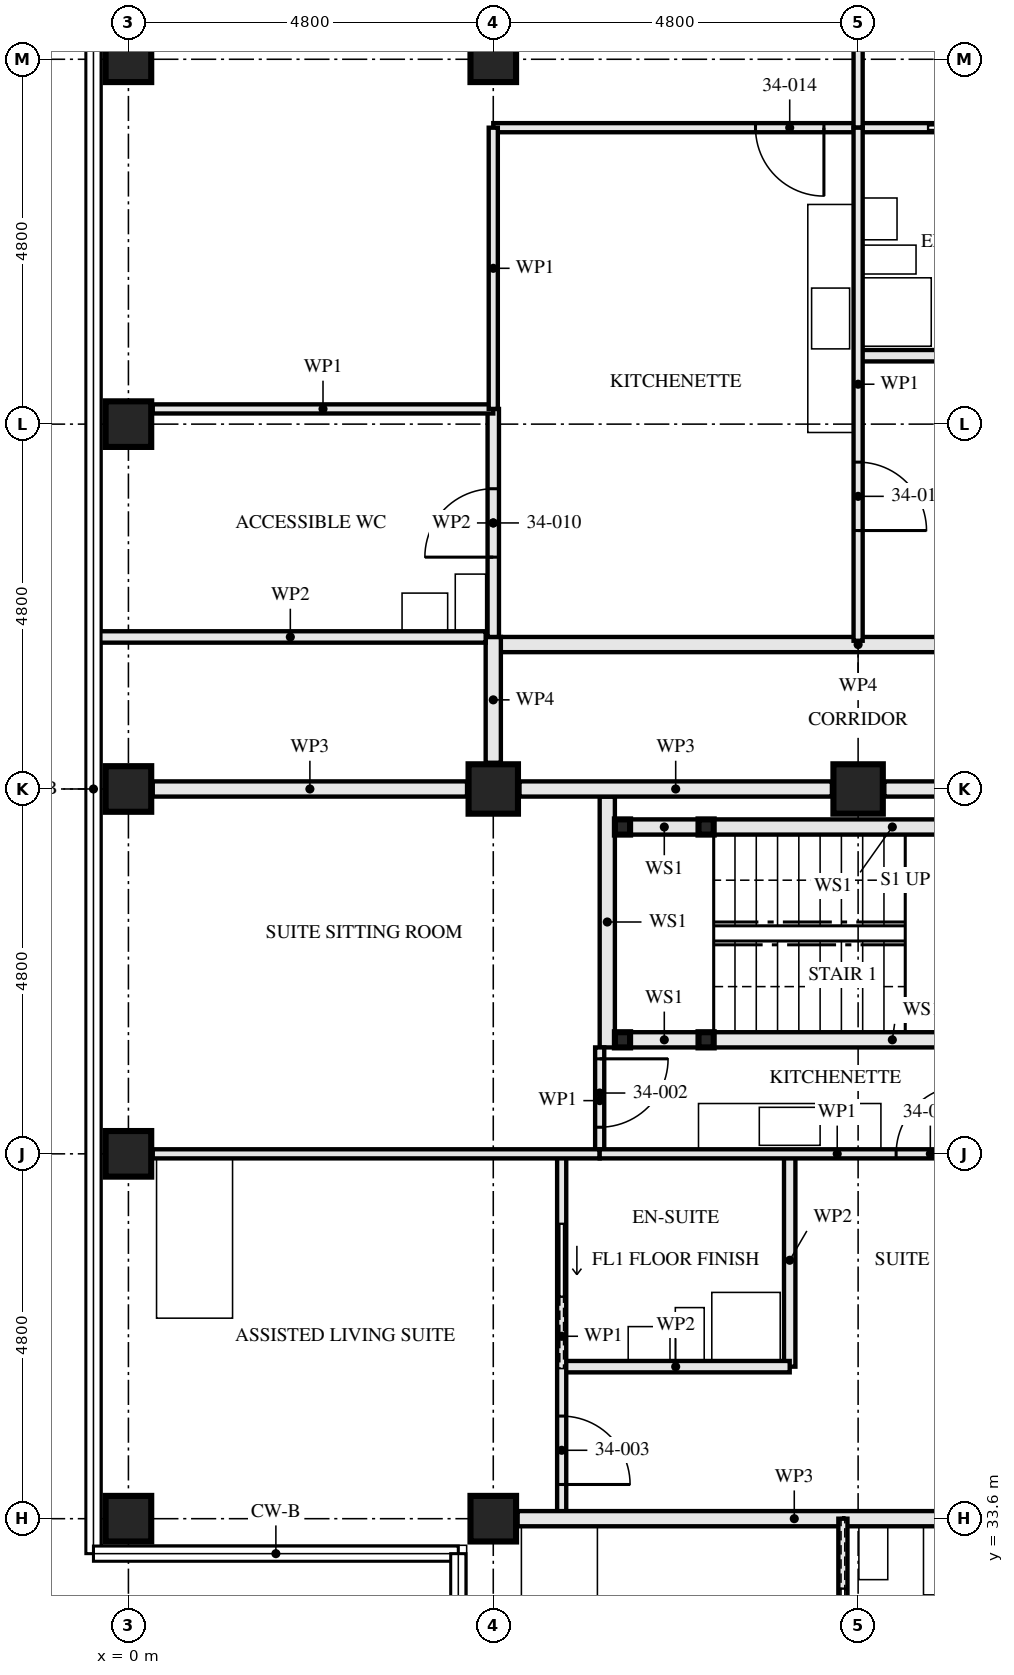
"""IFC4 building model, lengths in metres.
Left out: names, types, materials, properties, quantities, classifications, styles, units other than length and angle.
Written with IfcOpenShell. Run it as: python <this file> out.ifc"""

import sys

from ifc_helpers import new_model, si_unit, direction, frame, frame_2d, origin, origin_2d, place, context, subcontext, project, spatial, rectangle, hollow_rectangle, extrude, element, fill, save


model = new_model("IFC4")
c1 = context("Model", 3, precision=1e-05, world=origin(), true_north=direction((0.0, 1.0)))
c2 = subcontext(c1, "Body", "Model", "MODEL_VIEW")
j1 = project(units=[si_unit("LENGTHUNIT", "METRE"), si_unit("PLANEANGLEUNIT", "RADIAN")], contexts=[c1])
p1 = place(None, origin())
s1 = spatial("IfcSite", under=j1, at=p1, CompositionType="ELEMENT")
p2 = place(p1, origin())
s2 = spatial("IfcBuilding", under=s1, at=p2, CompositionType="ELEMENT")
p3 = place(p2, frame((0.0, 0.0, 126.0)))
s3 = spatial("IfcBuildingStorey", under=s2, at=p3, CompositionType="ELEMENT", Elevation=126.0)
for number, where, z_axis, x_axis in (
    (1, (0.0, 33.6, 0.0), (0.0, 0.0, 1.0), (0.0, 1.0, 0.0)),
    (2, (0.0, 38.4, 0.0), (0.0, 0.0, 1.0), (1.0, 0.0, 0.0)),
    (3, (0.0, 43.2, 0.0), (0.0, 0.0, 1.0), (0.0, 1.0, 0.0)),
    (4, (0.0, 48.0, 0.0), (0.0, 0.0, 1.0), (1.0, 0.0, 0.0)),
    (5, (0.0, 52.8, 0.0), (0.0, 0.0, 1.0), (0.0, 1.0, 0.0)),
    (6, (4.8, 33.6, 0.0), (0.0, 0.0, 1.0), (0.0, 1.0, 0.0)),
):
    element("IfcColumn", number, at=place(p3, frame(where, z_axis=z_axis, x_axis=x_axis)), inside=s3, PredefinedType="COLUMN", context=c2, shape_type="SweptSolid", body=[
        extrude(hollow_rectangle(XDim=0.6, YDim=0.6, WallThickness=0.08, at=origin_2d()), origin(), (0.0, 0.0, 1.0), 3.5),
    ])
p4 = place(p3, frame((4.8, 43.2, 0.0), z_axis=(0.0, 0.0, 1.0), x_axis=(0.0, 1.0, 0.0)))
e7 = element("IfcColumn", 7, at=p4, inside=s3, PredefinedType="COLUMN", context=c2, shape_type="SweptSolid", body=[
    extrude(hollow_rectangle(XDim=0.65, YDim=0.65, WallThickness=0.05, at=origin_2d()), origin(), (0.0, 0.0, 1.0), 3.5),
])
p5 = place(p3, frame((4.8, 52.8, 0.0), z_axis=(0.0, 0.0, 1.0), x_axis=(0.0, 1.0, 0.0)))
e8 = element("IfcColumn", 8, at=p5, inside=s3, PredefinedType="COLUMN", context=c2, shape_type="SweptSolid", body=[
    extrude(hollow_rectangle(XDim=0.6, YDim=0.6, WallThickness=0.08, at=origin_2d()), origin(), (0.0, 0.0, 1.0), 3.5),
])
p6 = place(p3, frame((9.6, 43.2, 0.0), z_axis=(0.0, 0.0, 1.0), x_axis=(0.0, 1.0, 0.0)))
e9 = element("IfcColumn", 9, at=p6, inside=s3, PredefinedType="COLUMN", context=c2, shape_type="SweptSolid", body=[
    extrude(hollow_rectangle(XDim=0.65, YDim=0.65, WallThickness=0.05, at=origin_2d()), origin(), (0.0, 0.0, 1.0), 3.5),
])
for number, where, z_axis, x_axis in (
    (10, (6.5, 42.7, 0.0), (0.0, 0.0, 1.0), (1.0, 0.0, 0.0)),
    (11, (6.5, 39.9, 0.0), (0.0, 0.0, 1.0), (1.0, 0.0, 0.0)),
    (12, (7.6, 42.7, 0.0), (0.0, 0.0, 1.0), (1.0, 0.0, 0.0)),
    (13, (7.6, 39.9, 0.0), (0.0, 0.0, 1.0), (1.0, 0.0, 0.0)),
):
    element("IfcColumn", number, at=place(p3, frame(where, z_axis=z_axis, x_axis=x_axis)), inside=s3, PredefinedType="COLUMN", context=c2, shape_type="SweptSolid", body=[
        extrude(hollow_rectangle(XDim=0.2, YDim=0.2, WallThickness=0.008, at=origin_2d()), origin(), (0.0, 0.0, 1.0), 3.33),
    ])
p7 = place(p3, frame((6.6, 42.7, 0.0), z_axis=(0.0, 0.0, 1.0), x_axis=(1.0, 0.0, 0.0)))
e14 = element("IfcWall", 14, at=p7, inside=s3, PredefinedType="SOLIDWALL", context=c2, shape_type="SweptSolid", body=[
    extrude(rectangle(XDim=0.9, YDim=0.2, at=frame_2d((0.45, 0.0))), origin(), (0.0, 0.0, 1.0), 2.99),
])
p8 = place(p3, frame((7.7, 42.7, 0.0), z_axis=(0.0, 0.0, 1.0), x_axis=(1.0, 0.0, 0.0)))
e15 = element("IfcWall", 15, at=p8, inside=s3, PredefinedType="SOLIDWALL", context=c2, shape_type="SweptSolid", body=[
    extrude(rectangle(XDim=4.7, YDim=0.2, at=frame_2d((2.35, 0.0))), origin(), (0.0, 0.0, 1.0), 2.99),
])
p9 = place(p3, frame((6.6, 39.9, 0.0), z_axis=(0.0, 0.0, 1.0), x_axis=(1.0, 0.0, 0.0)))
e16 = element("IfcWall", 16, at=p9, inside=s3, PredefinedType="SOLIDWALL", context=c2, shape_type="SweptSolid", body=[
    extrude(rectangle(XDim=0.9, YDim=0.2, at=frame_2d((0.45, 0.0))), origin(), (0.0, 0.0, 1.0), 2.99),
])
p10 = place(p3, frame((7.7, 39.9, 0.0), z_axis=(0.0, 0.0, 1.0), x_axis=(1.0, 0.0, 0.0)))
e17 = element("IfcWall", 17, at=p10, inside=s3, PredefinedType="SOLIDWALL", context=c2, shape_type="SweptSolid", body=[
    extrude(rectangle(XDim=4.7, YDim=0.2, at=frame_2d((2.35, 0.0))), origin(), (0.0, 0.0, 1.0), 2.99),
])
p11 = place(p3, frame((6.3, 43.1, 0.0), z_axis=(0.0, 0.0, 1.0), x_axis=(0.0, -1.0, 0.0)))
e18 = element("IfcWall", 18, at=p11, inside=s3, PredefinedType="SOLIDWALL", context=c2, shape_type="SweptSolid", body=[
    extrude(rectangle(XDim=3.3, YDim=0.2, at=frame_2d((1.65, 0.0))), origin(), (0.0, 0.0, 1.0), 3.33),
])
p12 = place(p3, frame((5.7, 35.6, 0.0), z_axis=(0.0, 0.0, 1.0), x_axis=(1.0, 0.0, 0.0)))
e19 = element("IfcWall", 19, at=p12, inside=s3, PredefinedType="PARTITIONING", context=c2, shape_type="SweptSolid", body=[
    extrude(rectangle(XDim=3.0, YDim=0.15, at=frame_2d((1.5, 0.0))), origin(), (0.0, 0.0, 1.0), 3.33),
])
p13 = place(p3, frame((8.7, 38.4, 0.0), z_axis=(0.0, 0.0, 1.0), x_axis=(0.0, -1.0, 0.0)))
e20 = element("IfcWall", 20, at=p13, inside=s3, PredefinedType="PARTITIONING", context=c2, shape_type="SweptSolid", body=[
    extrude(rectangle(XDim=2.8, YDim=0.15, at=frame_2d((1.4, 0.0))), origin(), (0.0, 0.0, 1.0), 3.33),
])
p14 = place(p3, frame((6.2, 38.4, 0.0), z_axis=(0.0, 0.0, 1.0), x_axis=(1.0, 0.0, 0.0)))
e21 = element("IfcWall", 21, at=p14, inside=s3, PredefinedType="PARTITIONING", context=c2, shape_type="SweptSolid", body=[
    extrude(rectangle(XDim=6.25, YDim=0.12, at=frame_2d((3.125, 0.0))), origin(), (0.0, 0.0, 1.0), 2.55),
])
p15 = place(p14, frame((3.9, 0.0, 0.0)))
e22 = element("IfcOpeningElement", 22, at=p15, cuts=e21, PredefinedType="OPENING", context=c2, shape_type="SweptSolid", body=[
    extrude(rectangle(XDim=0.9, YDim=2.1, at=frame_2d((0.45, 1.05))), frame((0.0, 0.071, 0.0), z_axis=(0.0, -1.0, 0.0), x_axis=(1.0, 0.0, 0.0)), (0.0, 0.0, 1.0), 0.141),
])
p16 = place(p3, frame((6.2, 39.8, 0.0), z_axis=(0.0, 0.0, 1.0), x_axis=(0.0, -1.0, 0.0)))
e23 = element("IfcWall", 23, at=p16, inside=s3, PredefinedType="PARTITIONING", context=c2, shape_type="SweptSolid", body=[
    extrude(rectangle(XDim=1.4, YDim=0.12, at=frame_2d((0.7, 0.0))), origin(), (0.0, 0.0, 1.0), 3.33),
])
p17 = place(p16, frame((0.15, 0.0, 0.0)))
e24 = element("IfcOpeningElement", 24, at=p17, cuts=e23, PredefinedType="OPENING", context=c2, shape_type="SweptSolid", body=[
    extrude(rectangle(XDim=0.9, YDim=2.1, at=frame_2d((0.45, 1.05))), frame((0.0, 0.071, 0.0), z_axis=(0.0, -1.0, 0.0), x_axis=(1.0, 0.0, 0.0)), (0.0, 0.0, 1.0), 0.141),
])
p18 = place(p3, frame((5.7, 38.4, 0.0), z_axis=(0.0, 0.0, 1.0), x_axis=(0.0, -1.0, 0.0)))
e25 = element("IfcWall", 25, at=p18, inside=s3, PredefinedType="PARTITIONING", context=c2, shape_type="SweptSolid", body=[
    extrude(rectangle(XDim=4.8, YDim=0.12, at=frame_2d((2.4, 0.0))), origin(), (0.0, 0.0, 1.0), 3.33),
])
p19 = place(p18, frame((3.45, 0.0, 0.0)))
e26 = element("IfcOpeningElement", 26, at=p19, cuts=e25, PredefinedType="OPENING", context=c2, shape_type="SweptSolid", body=[
    extrude(rectangle(XDim=0.9, YDim=2.1, at=frame_2d((0.45, 1.05))), frame((0.0, 0.071, 0.0), z_axis=(0.0, -1.0, 0.0), x_axis=(1.0, 0.0, 0.0)), (0.0, 0.0, 1.0), 0.141),
])
p20 = place(p18, frame((0.925, 0.0, 0.0)))
e27 = element("IfcOpeningElement", 27, at=p20, cuts=e25, PredefinedType="OPENING", context=c2, shape_type="SweptSolid", body=[
    extrude(rectangle(XDim=0.95, YDim=2.1, at=frame_2d((0.475, 1.05))), frame((0.0, 0.071, 0.0), z_axis=(0.0, -1.0, 0.0), x_axis=(1.0, 0.0, 0.0)), (0.0, 0.0, 1.0), 0.141),
])
p21 = place(p3, frame((0.32, 38.4, 0.0), z_axis=(0.0, 0.0, 1.0), x_axis=(1.0, 0.0, 0.0)))
e28 = element("IfcWall", 28, at=p21, inside=s3, PredefinedType="PARTITIONING", context=c2, shape_type="SweptSolid", body=[
    extrude(rectangle(XDim=5.88, YDim=0.12, at=frame_2d((2.94, 0.0))), origin(), (0.0, 0.0, 1.0), 2.55),
])
p22 = place(p3, frame((5.12, 33.6, 0.0), z_axis=(0.0, 0.0, 1.0), x_axis=(1.0, 0.0, 0.0)))
e29 = element("IfcWall", 29, at=p22, inside=s3, PredefinedType="PARTITIONING", context=c2, shape_type="SweptSolid", body=[
    extrude(rectangle(XDim=7.28, YDim=0.2, at=frame_2d((3.64, 0.0))), origin(), (0.0, 0.0, 1.0), 2.55),
])
p23 = place(p3, frame((9.4, 33.6, 0.0), z_axis=(0.0, 0.0, 1.0), x_axis=(0.0, -1.0, 0.0)))
e30 = element("IfcWall", 30, at=p23, inside=s3, PredefinedType="PARTITIONING", context=c2, shape_type="SweptSolid", body=[
    extrude(rectangle(XDim=4.48, YDim=0.12, at=frame_2d((2.24, 0.0))), origin(), (0.0, 0.0, 1.0), 3.33),
])
p24 = place(p23, frame((2.975, 0.0, 0.0)))
e31 = element("IfcOpeningElement", 31, at=p24, cuts=e30, PredefinedType="OPENING", context=c2, shape_type="SweptSolid", body=[
    extrude(rectangle(XDim=0.9, YDim=2.1, at=frame_2d((0.45, 1.05))), frame((0.0, 0.071, 0.0), z_axis=(0.0, -1.0, 0.0), x_axis=(1.0, 0.0, 0.0)), (0.0, 0.0, 1.0), 0.141),
])
p25 = place(p23, frame((0.925, 0.0, 0.0)))
e32 = element("IfcOpeningElement", 32, at=p25, cuts=e30, PredefinedType="OPENING", context=c2, shape_type="SweptSolid", body=[
    extrude(rectangle(XDim=0.95, YDim=2.1, at=frame_2d((0.475, 1.05))), frame((0.0, 0.071, 0.0), z_axis=(0.0, -1.0, 0.0), x_axis=(1.0, 0.0, 0.0)), (0.0, 0.0, 1.0), 0.141),
])
p26 = place(p3, frame((12.4, 48.9, 0.0), z_axis=(0.0, 0.0, 1.0), x_axis=(-1.0, 0.0, 0.0)))
e33 = element("IfcWall", 33, at=p26, inside=s3, PredefinedType="PARTITIONING", context=c2, shape_type="SweptSolid", body=[
    extrude(rectangle(XDim=2.8, YDim=0.15, at=frame_2d((1.4, 0.0))), origin(), (0.0, 0.0, 1.0), 3.33),
])
p27 = place(p3, frame((4.8, 48.2, 0.0), z_axis=(0.0, 0.0, 1.0), x_axis=(0.0, -1.0, 0.0)))
e34 = element("IfcWall", 34, at=p27, inside=s3, PredefinedType="PARTITIONING", context=c2, shape_type="SweptSolid", body=[
    extrude(rectangle(XDim=3.0, YDim=0.15, at=frame_2d((1.5, 0.0))), origin(), (0.0, 0.0, 1.0), 2.55),
])
p28 = place(p27, frame((1.05, 0.0, 0.0)))
e35 = element("IfcOpeningElement", 35, at=p28, cuts=e34, PredefinedType="OPENING", context=c2, shape_type="SweptSolid", body=[
    extrude(rectangle(XDim=0.9, YDim=2.1, at=frame_2d((0.45, 1.05))), frame((0.0, 0.085, 0.0), z_axis=(0.0, -1.0, 0.0), x_axis=(1.0, 0.0, 0.0)), (0.0, 0.0, 1.0), 0.171),
])
p29 = place(p3, frame((9.6, 51.9, 0.0), z_axis=(0.0, 0.0, 1.0), x_axis=(0.0, -1.0, 0.0)))
e36 = element("IfcWall", 36, at=p29, inside=s3, PredefinedType="PARTITIONING", context=c2, shape_type="SweptSolid", body=[
    extrude(rectangle(XDim=6.75, YDim=0.12, at=frame_2d((3.375, 0.0))), origin(), (0.0, 0.0, 1.0), 2.55),
])
p30 = place(p29, frame((4.4, 0.0, 0.0)))
e37 = element("IfcOpeningElement", 37, at=p30, cuts=e36, PredefinedType="OPENING", context=c2, shape_type="SweptSolid", body=[
    extrude(rectangle(XDim=0.9, YDim=2.1, at=frame_2d((0.45, 1.05))), frame((0.0, 0.071, 0.0), z_axis=(0.0, -1.0, 0.0), x_axis=(1.0, 0.0, 0.0)), (0.0, 0.0, 1.0), 0.141),
])
p31 = place(p3, frame((14.4, 51.9, 0.0), z_axis=(0.0, 0.0, 1.0), x_axis=(-1.0, 0.0, 0.0)))
e38 = element("IfcWall", 38, at=p31, inside=s3, PredefinedType="PARTITIONING", context=c2, shape_type="SweptSolid", body=[
    extrude(rectangle(XDim=4.8, YDim=0.12, at=frame_2d((2.4, 0.0))), origin(), (0.0, 0.0, 1.0), 3.33),
])
p32 = place(p31, frame((0.45, 0.0, 0.0)))
e39 = element("IfcOpeningElement", 39, at=p32, cuts=e38, PredefinedType="OPENING", context=c2, shape_type="SweptSolid", body=[
    extrude(rectangle(XDim=0.9, YDim=2.1, at=frame_2d((0.45, 1.05))), frame((0.0, 0.071, 0.0), z_axis=(0.0, -1.0, 0.0), x_axis=(1.0, 0.0, 0.0)), (0.0, 0.0, 1.0), 0.141),
])
p33 = place(p31, frame((2.925, 0.0, 0.0)))
e40 = element("IfcOpeningElement", 40, at=p33, cuts=e38, PredefinedType="OPENING", context=c2, shape_type="SweptSolid", body=[
    extrude(rectangle(XDim=0.95, YDim=2.1, at=frame_2d((0.475, 1.05))), frame((0.0, 0.071, 0.0), z_axis=(0.0, -1.0, 0.0), x_axis=(1.0, 0.0, 0.0)), (0.0, 0.0, 1.0), 0.141),
])
p34 = place(p3, frame((9.6, 51.9, 0.0), z_axis=(0.0, 0.0, 1.0), x_axis=(-1.0, 0.0, 0.0)))
e41 = element("IfcWall", 41, at=p34, inside=s3, PredefinedType="PARTITIONING", context=c2, shape_type="SweptSolid", body=[
    extrude(rectangle(XDim=4.8, YDim=0.12, at=frame_2d((2.4, 0.0))), origin(), (0.0, 0.0, 1.0), 3.33),
])
p35 = place(p34, frame((0.45, 0.0, 0.0)))
e42 = element("IfcOpeningElement", 42, at=p35, cuts=e41, PredefinedType="OPENING", context=c2, shape_type="SweptSolid", body=[
    extrude(rectangle(XDim=0.9, YDim=2.1, at=frame_2d((0.45, 1.05))), frame((0.0, 0.071, 0.0), z_axis=(0.0, -1.0, 0.0), x_axis=(1.0, 0.0, 0.0)), (0.0, 0.0, 1.0), 0.141),
])
p36 = place(p3, frame((4.8, 48.2, 0.0), z_axis=(0.0, 0.0, 1.0), x_axis=(-1.0, 0.0, 0.0)))
e43 = element("IfcWall", 43, at=p36, inside=s3, PredefinedType="PARTITIONING", context=c2, shape_type="SweptSolid", body=[
    extrude(rectangle(XDim=4.48, YDim=0.12, at=frame_2d((2.24, 0.0))), origin(), (0.0, 0.0, 1.0), 3.33),
])
p37 = place(p3, frame((9.6, 57.28, 0.0), z_axis=(0.0, 0.0, 1.0), x_axis=(0.0, -1.0, 0.0)))
e44 = element("IfcWall", 44, at=p37, inside=s3, PredefinedType="PARTITIONING", context=c2, shape_type="SweptSolid", body=[
    extrude(rectangle(XDim=5.38, YDim=0.12, at=frame_2d((2.69, 0.0))), origin(), (0.0, 0.0, 1.0), 2.55),
])
p38 = place(p3, frame((4.8, 51.9, 0.0), z_axis=(0.0, 0.0, 1.0), x_axis=(0.0, -1.0, 0.0)))
e45 = element("IfcWall", 45, at=p38, inside=s3, PredefinedType="PARTITIONING", context=c2, shape_type="SweptSolid", body=[
    extrude(rectangle(XDim=3.7, YDim=0.12, at=frame_2d((1.85, 0.0))), origin(), (0.0, 0.0, 1.0), 3.33),
])
p39 = place(p3, frame((14.4, 45.1, 0.0), z_axis=(0.0, 0.0, 1.0), x_axis=(-1.0, 0.0, 0.0)))
e46 = element("IfcWall", 46, at=p39, inside=s3, PredefinedType="PARTITIONING", context=c2, shape_type="SweptSolid", body=[
    extrude(rectangle(XDim=9.6, YDim=0.2, at=frame_2d((4.8, 0.0))), origin(), (0.0, 0.0, 1.0), 3.33),
])
p40 = place(p39, frame((0.4, 0.0, 0.0)))
e47 = element("IfcOpeningElement", 47, at=p40, cuts=e46, PredefinedType="OPENING", context=c2, shape_type="SweptSolid", body=[
    extrude(rectangle(XDim=1.0, YDim=2.1, at=frame_2d((0.5, 1.05))), frame((0.0, 0.111, 0.0), z_axis=(0.0, -1.0, 0.0), x_axis=(1.0, 0.0, 0.0)), (0.0, 0.0, 1.0), 0.221),
])
p41 = place(p3, frame((4.8, 45.2, 0.0), z_axis=(0.0, 0.0, 1.0), x_axis=(0.0, -1.0, 0.0)))
e48 = element("IfcWall", 48, at=p41, inside=s3, PredefinedType="PARTITIONING", context=c2, shape_type="SweptSolid", body=[
    extrude(rectangle(XDim=1.655, YDim=0.2, at=frame_2d((0.828, 0.0))), origin(), (0.0, 0.0, 1.0), 3.33),
])
p42 = place(p3, frame((12.5, 43.2, 0.0), z_axis=(0.0, 0.0, 1.0), x_axis=(-1.0, 0.0, 0.0)))
e49 = element("IfcWall", 49, at=p42, inside=s3, PredefinedType="PARTITIONING", context=c2, shape_type="SweptSolid", body=[
    extrude(rectangle(XDim=2.555, YDim=0.2, at=frame_2d((1.277, 0.0))), origin(), (0.0, 0.0, 1.0), 2.32),
])
p43 = place(p3, frame((9.255, 43.2, 0.0), z_axis=(0.0, 0.0, 1.0), x_axis=(-1.0, 0.0, 0.0)))
e50 = element("IfcWall", 50, at=p43, inside=s3, PredefinedType="PARTITIONING", context=c2, shape_type="SweptSolid", body=[
    extrude(rectangle(XDim=4.11, YDim=0.2, at=frame_2d((2.055, 0.0))), origin(), (0.0, 0.0, 1.0), 2.32),
])
p44 = place(p3, frame((4.455, 43.2, 0.0), z_axis=(0.0, 0.0, 1.0), x_axis=(-1.0, 0.0, 0.0)))
e51 = element("IfcWall", 51, at=p44, inside=s3, PredefinedType="PARTITIONING", context=c2, shape_type="SweptSolid", body=[
    extrude(rectangle(XDim=4.135, YDim=0.2, at=frame_2d((2.067, 0.0))), origin(), (0.0, 0.0, 1.0), 2.32),
])
p45 = place(p3, frame((4.7, 45.2, 0.0), z_axis=(0.0, 0.0, 1.0), x_axis=(-1.0, 0.0, 0.0)))
e52 = element("IfcWall", 52, at=p45, inside=s3, PredefinedType="PARTITIONING", context=c2, shape_type="SweptSolid", body=[
    extrude(rectangle(XDim=5.14, YDim=0.15, at=frame_2d((2.57, 0.0))), origin(), (0.0, 0.0, 1.0), 2.32),
])
p46 = place(p15, origin())
e53 = element("IfcDoor", 53, at=p46, inside=s3, OperationType="SINGLE_SWING_LEFT", PredefinedType="DOOR", context=c2, shape_type="SweptSolid", body=[
    extrude(rectangle(XDim=0.9, YDim=2.1, at=frame_2d((0.45, 1.05))), frame((0.0, 0.022, 0.0), z_axis=(0.0, -1.0, 0.0), x_axis=(1.0, 0.0, 0.0)), (0.0, 0.0, 1.0), 0.044),
])
fill(e22, e53)
p47 = place(p17, origin())
e54 = element("IfcDoor", 54, at=p47, inside=s3, OperationType="SINGLE_SWING_RIGHT", PredefinedType="DOOR", context=c2, shape_type="SweptSolid", body=[
    extrude(rectangle(XDim=0.9, YDim=2.1, at=frame_2d((0.45, 1.05))), frame((0.0, 0.022, 0.0), z_axis=(0.0, -1.0, 0.0), x_axis=(1.0, 0.0, 0.0)), (0.0, 0.0, 1.0), 0.044),
])
fill(e24, e54)
p48 = place(p19, origin())
e55 = element("IfcDoor", 55, at=p48, inside=s3, OperationType="SINGLE_SWING_LEFT", PredefinedType="DOOR", context=c2, shape_type="SweptSolid", body=[
    extrude(rectangle(XDim=0.9, YDim=2.1, at=frame_2d((0.45, 1.05))), frame((0.0, 0.022, 0.0), z_axis=(0.0, -1.0, 0.0), x_axis=(1.0, 0.0, 0.0)), (0.0, 0.0, 1.0), 0.044),
])
fill(e26, e55)
p49 = place(p20, origin())
e56 = element("IfcDoor", 56, at=p49, inside=s3, OperationType="SLIDING_TO_LEFT", PredefinedType="DOOR", context=c2, shape_type="SweptSolid", body=[
    extrude(rectangle(XDim=0.95, YDim=2.1, at=frame_2d((0.475, 1.05))), frame((0.0, 0.022, 0.0), z_axis=(0.0, -1.0, 0.0), x_axis=(1.0, 0.0, 0.0)), (0.0, 0.0, 1.0), 0.044),
])
fill(e27, e56)
p50 = place(p25, origin())
e57 = element("IfcDoor", 57, at=p50, inside=s3, OperationType="SLIDING_TO_RIGHT", PredefinedType="DOOR", context=c2, shape_type="SweptSolid", body=[
    extrude(rectangle(XDim=0.95, YDim=2.1, at=frame_2d((0.475, 1.05))), frame((0.0, 0.022, 0.0), z_axis=(0.0, -1.0, 0.0), x_axis=(1.0, 0.0, 0.0)), (0.0, 0.0, 1.0), 0.044),
])
fill(e32, e57)
p51 = place(p28, frame((0.9, 0.0, 0.0), z_axis=(0.0, 0.0, 1.0), x_axis=(-1.0, 0.0, 0.0)))
e58 = element("IfcDoor", 58, at=p51, inside=s3, OperationType="SINGLE_SWING_RIGHT", PredefinedType="DOOR", context=c2, shape_type="SweptSolid", body=[
    extrude(rectangle(XDim=0.9, YDim=2.1, at=frame_2d((0.45, 1.05))), frame((0.0, 0.022, 0.0), z_axis=(0.0, -1.0, 0.0), x_axis=(1.0, 0.0, 0.0)), (0.0, 0.0, 1.0), 0.044),
])
fill(e35, e58)
p52 = place(p30, origin())
e59 = element("IfcDoor", 59, at=p52, inside=s3, OperationType="SINGLE_SWING_LEFT", PredefinedType="DOOR", context=c2, shape_type="SweptSolid", body=[
    extrude(rectangle(XDim=0.9, YDim=2.1, at=frame_2d((0.45, 1.05))), frame((0.0, 0.022, 0.0), z_axis=(0.0, -1.0, 0.0), x_axis=(1.0, 0.0, 0.0)), (0.0, 0.0, 1.0), 0.044),
])
fill(e37, e59)
p53 = place(p33, origin())
e60 = element("IfcDoor", 60, at=p53, inside=s3, OperationType="SLIDING_TO_RIGHT", PredefinedType="DOOR", context=c2, shape_type="SweptSolid", body=[
    extrude(rectangle(XDim=0.95, YDim=2.1, at=frame_2d((0.475, 1.05))), frame((0.0, 0.022, 0.0), z_axis=(0.0, -1.0, 0.0), x_axis=(1.0, 0.0, 0.0)), (0.0, 0.0, 1.0), 0.044),
])
fill(e40, e60)
p54 = place(p35, origin())
e61 = element("IfcDoor", 61, at=p54, inside=s3, OperationType="SINGLE_SWING_RIGHT", PredefinedType="DOOR", context=c2, shape_type="SweptSolid", body=[
    extrude(rectangle(XDim=0.9, YDim=2.1, at=frame_2d((0.45, 1.05))), frame((0.0, 0.022, 0.0), z_axis=(0.0, -1.0, 0.0), x_axis=(1.0, 0.0, 0.0)), (0.0, 0.0, 1.0), 0.044),
])
fill(e42, e61)
save(model, sys.argv[1])
